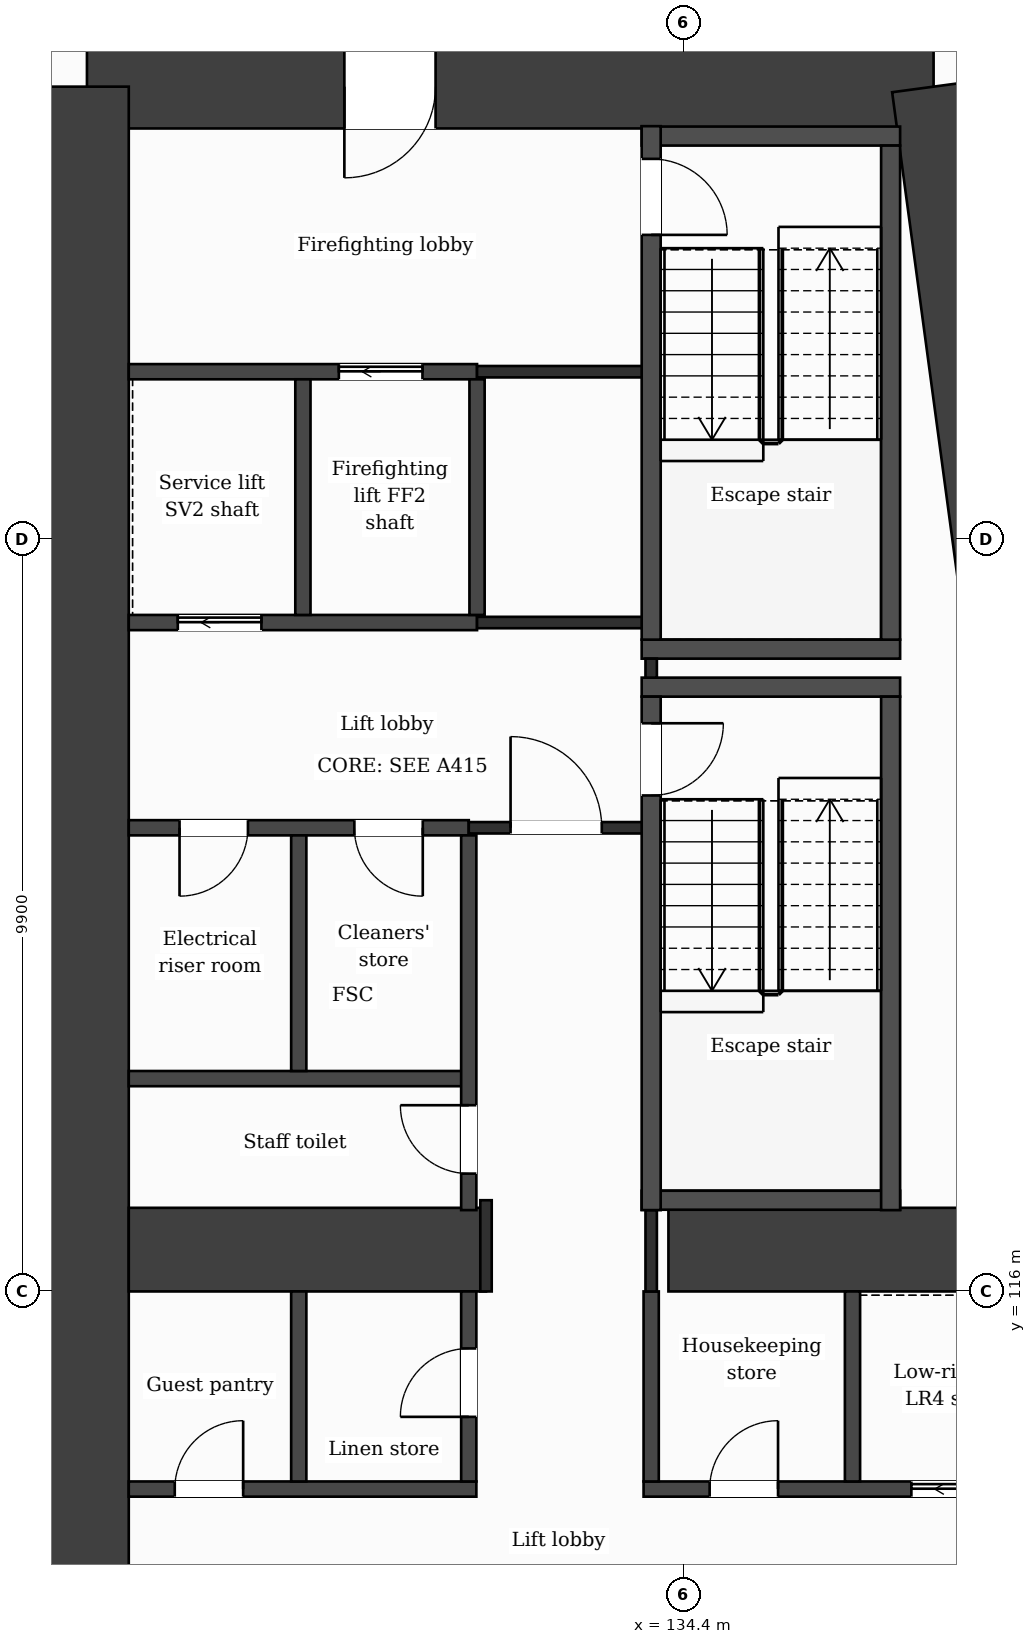
"""IFC4 building model, lengths in metres.
Left out: names, types, materials, properties, quantities, classifications, styles, units other than length and angle.
Written with IfcOpenShell. Run it as: python <this file> out.ifc"""

import sys

from ifc_helpers import new_model, si_unit, direction, frame, frame_2d, origin, place, context, subcontext, project, spatial, rectangle, extrude, element, fill, save


model = new_model("IFC4")
c1 = context("Model", 3, precision=1e-05, world=origin(), true_north=direction((0.0, 1.0)))
c2 = subcontext(c1, "Body", "Model", "MODEL_VIEW")
j1 = project(units=[si_unit("LENGTHUNIT", "METRE"), si_unit("PLANEANGLEUNIT", "RADIAN")], contexts=[c1])
p1 = place(None, origin())
s1 = spatial("IfcSite", under=j1, at=p1, CompositionType="ELEMENT")
p2 = place(p1, origin())
s2 = spatial("IfcBuilding", under=s1, at=p2, CompositionType="ELEMENT")
p3 = place(p2, frame((0.0, 0.0, 67.0)))
s3 = spatial("IfcBuildingStorey", under=s2, at=p3, CompositionType="ELEMENT", Elevation=67.0)
p4 = place(p3, frame((126.55, 131.85, 0.0), z_axis=(0.0, 0.0, 1.0), x_axis=(1.0, 0.0, 0.0)))
e1 = element("IfcWall", 1, at=p4, inside=s3, PredefinedType="SHEAR", context=c2, shape_type="SweptSolid", body=[
    extrude(rectangle(XDim=11.138, YDim=1.1, at=frame_2d((5.569, 0.0))), origin(), (0.0, 0.0, 1.0), 3.5),
])
p5 = place(p4, frame((3.386, 0.0, 0.0)))
e2 = element("IfcOpeningElement", 2, at=p5, cuts=e1, PredefinedType="OPENING", context=c2, shape_type="SweptSolid", body=[
    extrude(rectangle(XDim=1.2, YDim=2.1, at=frame_2d((0.6, 1.05))), frame((0.0, 0.56, 0.0), z_axis=(0.0, -1.0, 0.0), x_axis=(1.0, 0.0, 0.0)), (0.0, 0.0, 1.0), 1.12),
])
p6 = place(p3, frame((137.688, 131.85, 0.0), z_axis=(0.0, 0.0, 1.0), x_axis=(0.133411793472, -0.991060691059, 0.0)))
e3 = element("IfcWall", 3, at=p6, inside=s3, PredefinedType="SHEAR", context=c2, shape_type="SweptSolid", body=[
    extrude(rectangle(XDim=21.089, YDim=1.1, at=frame_2d((10.544, 0.0))), origin(), (0.0, 0.0, 1.0), 3.5),
])
p7 = place(p3, frame((126.55, 110.95, 0.0), z_axis=(0.0, 0.0, 1.0), x_axis=(0.0, 1.0, 0.0)))
e4 = element("IfcWall", 4, at=p7, inside=s3, PredefinedType="SHEAR", context=c2, shape_type="SweptSolid", body=[
    extrude(rectangle(XDim=20.9, YDim=1.1, at=frame_2d((10.45, 0.0))), origin(), (0.0, 0.0, 1.0), 3.5),
])
p8 = place(p3, frame((127.1, 116.55, 0.0), z_axis=(0.0, 0.0, 1.0), x_axis=(1.0, 0.0, 0.0)))
e5 = element("IfcWall", 5, at=p8, inside=s3, PredefinedType="SHEAR", context=c2, shape_type="SweptSolid", body=[
    extrude(rectangle(XDim=4.7, YDim=1.1, at=frame_2d((2.35, 0.0))), origin(), (0.0, 0.0, 1.0), 3.5),
])
p9 = place(p3, frame((134.2, 116.55, 0.0), z_axis=(0.0, 0.0, 1.0), x_axis=(1.0, 0.0, 0.0)))
e6 = element("IfcWall", 6, at=p9, inside=s3, PredefinedType="SHEAR", context=c2, shape_type="SweptSolid", body=[
    extrude(rectangle(XDim=5.077, YDim=1.1, at=frame_2d((2.539, 0.0))), origin(), (0.0, 0.0, 1.0), 3.5),
])
p10 = place(p3, frame((127.1, 113.4, 0.0), z_axis=(0.0, 0.0, 1.0), x_axis=(1.0, 0.0, 0.0)))
e7 = element("IfcWall", 7, at=p10, inside=s3, PredefinedType="PARTITIONING", context=c2, shape_type="SweptSolid", body=[
    extrude(rectangle(XDim=4.573, YDim=0.2, at=frame_2d((2.287, 0.0))), origin(), (0.0, 0.0, 1.0), 3.18),
])
p11 = place(p10, frame((0.605, 0.0, 0.0)))
e8 = element("IfcOpeningElement", 8, at=p11, cuts=e7, PredefinedType="OPENING", context=c2, shape_type="SweptSolid", body=[
    extrude(rectangle(XDim=0.9, YDim=2.1, at=frame_2d((0.45, 1.05))), frame((0.0, 0.11, 0.0), z_axis=(0.0, -1.0, 0.0), x_axis=(1.0, 0.0, 0.0)), (0.0, 0.0, 1.0), 0.22),
])
p12 = place(p3, frame((133.873, 113.4, 0.0), z_axis=(0.0, 0.0, 1.0), x_axis=(1.0, 0.0, 0.0)))
e9 = element("IfcWall", 9, at=p12, inside=s3, PredefinedType="PARTITIONING", context=c2, shape_type="SweptSolid", body=[
    extrude(rectangle(XDim=5.774, YDim=0.2, at=frame_2d((2.887, 0.0))), origin(), (0.0, 0.0, 1.0), 3.18),
])
p13 = place(p12, frame((3.523, 0.0, 0.0)))
e10 = element("IfcOpeningElement", 10, at=p13, cuts=e9, PredefinedType="OPENING", context=c2, shape_type="SweptSolid", body=[
    extrude(rectangle(XDim=1.1, YDim=2.1, at=frame_2d((0.55, 1.05))), frame((0.0, 0.11, 0.0), z_axis=(0.0, -1.0, 0.0), x_axis=(1.0, 0.0, 0.0)), (0.0, 0.0, 1.0), 0.22),
])
p14 = place(p12, frame((0.869, 0.0, 0.0)))
e11 = element("IfcOpeningElement", 11, at=p14, cuts=e9, PredefinedType="OPENING", context=c2, shape_type="SweptSolid", body=[
    extrude(rectangle(XDim=0.9, YDim=2.1, at=frame_2d((0.45, 1.05))), frame((0.0, 0.11, 0.0), z_axis=(0.0, -1.0, 0.0), x_axis=(1.0, 0.0, 0.0)), (0.0, 0.0, 1.0), 0.22),
])
p15 = place(p3, frame((133.848, 117.2, 0.0), z_axis=(0.0, 0.0, 1.0), x_axis=(1.0, 0.0, 0.0)))
e12 = element("IfcWall", 12, at=p15, inside=s3, PredefinedType="PARTITIONING", context=c2, shape_type="SweptSolid", body=[
    extrude(rectangle(XDim=3.4, YDim=0.25, at=frame_2d((1.7, 0.0))), origin(), (0.0, 0.0, 1.0), 3.18),
])
p16 = place(p3, frame((127.1, 118.8, 0.0), z_axis=(0.0, 0.0, 1.0), x_axis=(1.0, 0.0, 0.0)))
e13 = element("IfcWall", 13, at=p16, inside=s3, PredefinedType="PARTITIONING", context=c2, shape_type="SweptSolid", body=[
    extrude(rectangle(XDim=4.473, YDim=0.2, at=frame_2d((2.236, 0.0))), origin(), (0.0, 0.0, 1.0), 3.18),
])
p17 = place(p3, frame((127.1, 122.1, 0.0), z_axis=(0.0, 0.0, 1.0), x_axis=(1.0, 0.0, 0.0)))
e14 = element("IfcWall", 14, at=p17, inside=s3, PredefinedType="PARTITIONING", context=c2, shape_type="SweptSolid", body=[
    extrude(rectangle(XDim=4.473, YDim=0.2, at=frame_2d((2.236, 0.0))), origin(), (0.0, 0.0, 1.0), 3.18),
])
p18 = place(p17, frame((2.968, 0.0, 0.0)))
e15 = element("IfcOpeningElement", 15, at=p18, cuts=e14, PredefinedType="OPENING", context=c2, shape_type="SweptSolid", body=[
    extrude(rectangle(XDim=0.9, YDim=2.1, at=frame_2d((0.45, 1.05))), frame((0.0, 0.11, 0.0), z_axis=(0.0, -1.0, 0.0), x_axis=(1.0, 0.0, 0.0)), (0.0, 0.0, 1.0), 0.22),
])
p19 = place(p17, frame((0.668, 0.0, 0.0)))
e16 = element("IfcOpeningElement", 16, at=p19, cuts=e14, PredefinedType="OPENING", context=c2, shape_type="SweptSolid", body=[
    extrude(rectangle(XDim=0.9, YDim=2.1, at=frame_2d((0.45, 1.05))), frame((0.0, 0.11, 0.0), z_axis=(0.0, -1.0, 0.0), x_axis=(1.0, 0.0, 0.0)), (0.0, 0.0, 1.0), 0.22),
])
p20 = place(p3, frame((131.573, 122.1, 0.0), z_axis=(0.0, 0.0, 1.0), x_axis=(1.0, 0.0, 0.0)))
e17 = element("IfcWall", 17, at=p20, inside=s3, PredefinedType="PARTITIONING", context=c2, shape_type="SweptSolid", body=[
    extrude(rectangle(XDim=2.4, YDim=0.15, at=frame_2d((1.2, 0.0))), origin(), (0.0, 0.0, 1.0), 3.18),
])
p21 = place(p20, frame((0.55, 0.0, 0.0)))
e18 = element("IfcOpeningElement", 18, at=p21, cuts=e17, PredefinedType="OPENING", context=c2, shape_type="SweptSolid", body=[
    extrude(rectangle(XDim=1.2, YDim=2.1, at=frame_2d((0.6, 1.05))), frame((0.0, 0.085, 0.0), z_axis=(0.0, -1.0, 0.0), x_axis=(1.0, 0.0, 0.0)), (0.0, 0.0, 1.0), 0.17),
])
for number, where, z_axis, x_axis in (
    (19, (133.848, 123.95, 0.0), (0.0, 0.0, 1.0), (1.0, 0.0, 0.0)),
    (20, (133.848, 124.45, 0.0), (0.0, 0.0, 1.0), (1.0, 0.0, 0.0)),
):
    element("IfcWall", number, at=place(p3, frame(where, z_axis=z_axis, x_axis=x_axis)), inside=s3, PredefinedType="PARTITIONING", context=c2, shape_type="SweptSolid", body=[
        extrude(rectangle(XDim=3.4, YDim=0.25, at=frame_2d((1.7, 0.0))), origin(), (0.0, 0.0, 1.0), 3.18),
    ])
p22 = place(p3, frame((127.1, 124.8, 0.0), z_axis=(0.0, 0.0, 1.0), x_axis=(1.0, 0.0, 0.0)))
e21 = element("IfcWall", 21, at=p22, inside=s3, PredefinedType="PARTITIONING", context=c2, shape_type="SweptSolid", body=[
    extrude(rectangle(XDim=4.582, YDim=0.2, at=frame_2d((2.291, 0.0))), origin(), (0.0, 0.0, 1.0), 3.18),
])
p23 = place(p22, frame((0.645, 0.0, 0.0)))
e22 = element("IfcOpeningElement", 22, at=p23, cuts=e21, PredefinedType="OPENING", context=c2, shape_type="SweptSolid", body=[
    extrude(rectangle(XDim=1.1, YDim=2.1, at=frame_2d((0.55, 1.05))), frame((0.0, 0.11, 0.0), z_axis=(0.0, -1.0, 0.0), x_axis=(1.0, 0.0, 0.0)), (0.0, 0.0, 1.0), 0.22),
])
p24 = place(p3, frame((131.682, 124.8, 0.0), z_axis=(0.0, 0.0, 1.0), x_axis=(1.0, 0.0, 0.0)))
e23 = element("IfcWall", 23, at=p24, inside=s3, PredefinedType="PARTITIONING", context=c2, shape_type="SweptSolid", body=[
    extrude(rectangle(XDim=2.416, YDim=0.15, at=frame_2d((1.208, 0.0))), origin(), (0.0, 0.0, 1.0), 3.18),
])
p25 = place(p3, frame((127.1, 128.1, 0.0), z_axis=(0.0, 0.0, 1.0), x_axis=(1.0, 0.0, 0.0)))
e24 = element("IfcWall", 24, at=p25, inside=s3, PredefinedType="PARTITIONING", context=c2, shape_type="SweptSolid", body=[
    extrude(rectangle(XDim=4.582, YDim=0.2, at=frame_2d((2.291, 0.0))), origin(), (0.0, 0.0, 1.0), 3.18),
])
p26 = place(p25, frame((2.764, 0.0, 0.0)))
e25 = element("IfcOpeningElement", 25, at=p26, cuts=e24, PredefinedType="OPENING", context=c2, shape_type="SweptSolid", body=[
    extrude(rectangle(XDim=1.1, YDim=2.1, at=frame_2d((0.55, 1.05))), frame((0.0, 0.11, 0.0), z_axis=(0.0, -1.0, 0.0), x_axis=(1.0, 0.0, 0.0)), (0.0, 0.0, 1.0), 0.22),
])
p27 = place(p3, frame((131.682, 128.1, 0.0), z_axis=(0.0, 0.0, 1.0), x_axis=(1.0, 0.0, 0.0)))
e26 = element("IfcWall", 26, at=p27, inside=s3, PredefinedType="PARTITIONING", context=c2, shape_type="SweptSolid", body=[
    extrude(rectangle(XDim=2.291, YDim=0.15, at=frame_2d((1.146, 0.0))), origin(), (0.0, 0.0, 1.0), 3.18),
])
p28 = place(p3, frame((133.848, 131.2, 0.0), z_axis=(0.0, 0.0, 1.0), x_axis=(1.0, 0.0, 0.0)))
e27 = element("IfcWall", 27, at=p28, inside=s3, PredefinedType="PARTITIONING", context=c2, shape_type="SweptSolid", body=[
    extrude(rectangle(XDim=3.4, YDim=0.25, at=frame_2d((1.7, 0.0))), origin(), (0.0, 0.0, 1.0), 3.18),
])
p29 = place(p3, frame((129.336, 113.5, 0.0), z_axis=(0.0, 0.0, 1.0), x_axis=(0.0, 1.0, 0.0)))
e28 = element("IfcWall", 28, at=p29, inside=s3, PredefinedType="PARTITIONING", context=c2, shape_type="SweptSolid", body=[
    extrude(rectangle(XDim=2.5, YDim=0.2, at=frame_2d((1.25, 0.0))), origin(), (0.0, 0.0, 1.0), 3.18),
])
for number, where, z_axis, x_axis in (
    (29, (129.336, 118.9, 0.0), (0.0, 0.0, 1.0), (0.0, 1.0, 0.0)),
    (30, (129.391, 124.9, 0.0), (0.0, 0.0, 1.0), (0.0, 1.0, 0.0)),
):
    element("IfcWall", number, at=place(p3, frame(where, z_axis=z_axis, x_axis=x_axis)), inside=s3, PredefinedType="PARTITIONING", context=c2, shape_type="SweptSolid", body=[
        extrude(rectangle(XDim=3.1, YDim=0.2, at=frame_2d((1.55, 0.0))), origin(), (0.0, 0.0, 1.0), 3.18),
    ])
p30 = place(p3, frame((131.573, 113.5, 0.0), z_axis=(0.0, 0.0, 1.0), x_axis=(0.0, 1.0, 0.0)))
e31 = element("IfcWall", 31, at=p30, inside=s3, PredefinedType="PARTITIONING", context=c2, shape_type="SweptSolid", body=[
    extrude(rectangle(XDim=2.5, YDim=0.2, at=frame_2d((1.25, 0.0))), origin(), (0.0, 0.0, 1.0), 3.18),
])
p31 = place(p30, frame((0.85, 0.0, 0.0)))
e32 = element("IfcOpeningElement", 32, at=p31, cuts=e31, PredefinedType="OPENING", context=c2, shape_type="SweptSolid", body=[
    extrude(rectangle(XDim=0.9, YDim=2.1, at=frame_2d((0.45, 1.05))), frame((0.0, 0.11, 0.0), z_axis=(0.0, -1.0, 0.0), x_axis=(1.0, 0.0, 0.0)), (0.0, 0.0, 1.0), 0.22),
])
p32 = place(p3, frame((131.573, 117.07, 0.0), z_axis=(0.0, 0.0, 1.0), x_axis=(0.0, 1.0, 0.0)))
e33 = element("IfcWall", 33, at=p32, inside=s3, PredefinedType="PARTITIONING", context=c2, shape_type="SweptSolid", body=[
    extrude(rectangle(XDim=4.93, YDim=0.2, at=frame_2d((2.465, 0.0))), origin(), (0.0, 0.0, 1.0), 3.18),
])
p33 = place(p32, frame((0.48, 0.0, 0.0)))
e34 = element("IfcOpeningElement", 34, at=p33, cuts=e33, PredefinedType="OPENING", context=c2, shape_type="SweptSolid", body=[
    extrude(rectangle(XDim=0.9, YDim=2.1, at=frame_2d((0.45, 1.05))), frame((0.0, 0.11, 0.0), z_axis=(0.0, -1.0, 0.0), x_axis=(1.0, 0.0, 0.0)), (0.0, 0.0, 1.0), 0.22),
])
p34 = place(p3, frame((131.682, 124.9, 0.0), z_axis=(0.0, 0.0, 1.0), x_axis=(0.0, 1.0, 0.0)))
e35 = element("IfcWall", 35, at=p34, inside=s3, PredefinedType="PARTITIONING", context=c2, shape_type="SweptSolid", body=[
    extrude(rectangle(XDim=3.1, YDim=0.2, at=frame_2d((1.55, 0.0))), origin(), (0.0, 0.0, 1.0), 3.18),
])
p35 = place(p3, frame((131.8, 116.0, 0.0), z_axis=(0.0, 0.0, 1.0), x_axis=(0.0, 1.0, 0.0)))
e36 = element("IfcWall", 36, at=p35, inside=s3, PredefinedType="PARTITIONING", context=c2, shape_type="SweptSolid", body=[
    extrude(rectangle(XDim=1.2, YDim=0.15, at=frame_2d((0.6, 0.0))), origin(), (0.0, 0.0, 1.0), 3.18),
])
p36 = place(p3, frame((133.973, 113.5, 0.0), z_axis=(0.0, 0.0, 1.0), x_axis=(0.0, 1.0, 0.0)))
e37 = element("IfcWall", 37, at=p36, inside=s3, PredefinedType="PARTITIONING", context=c2, shape_type="SweptSolid", body=[
    extrude(rectangle(XDim=2.5, YDim=0.2, at=frame_2d((1.25, 0.0))), origin(), (0.0, 0.0, 1.0), 3.18),
])
p37 = place(p3, frame((133.973, 116.0, 0.0), z_axis=(0.0, 0.0, 1.0), x_axis=(0.0, 1.0, 0.0)))
e38 = element("IfcWall", 38, at=p37, inside=s3, PredefinedType="PARTITIONING", context=c2, shape_type="SweptSolid", body=[
    extrude(rectangle(XDim=1.07, YDim=0.15, at=frame_2d((0.535, 0.0))), origin(), (0.0, 0.0, 1.0), 3.18),
])
p38 = place(p3, frame((133.973, 124.075, 0.0), z_axis=(0.0, 0.0, 1.0), x_axis=(0.0, 1.0, 0.0)))
e39 = element("IfcWall", 39, at=p38, inside=s3, PredefinedType="PARTITIONING", context=c2, shape_type="SweptSolid", body=[
    extrude(rectangle(XDim=0.25, YDim=0.15, at=frame_2d((0.125, 0.0))), origin(), (0.0, 0.0, 1.0), 3.18),
])
p39 = place(p3, frame((133.973, 117.07, 0.0), z_axis=(0.0, 0.0, 1.0), x_axis=(0.0, 1.0, 0.0)))
e40 = element("IfcWall", 40, at=p39, inside=s3, PredefinedType="PARTITIONING", context=c2, shape_type="SweptSolid", body=[
    extrude(rectangle(XDim=6.755, YDim=0.25, at=frame_2d((3.377, 0.0))), origin(), (0.0, 0.0, 1.0), 3.18),
])
p40 = place(p39, frame((5.455, 0.0, 0.0)))
e41 = element("IfcOpeningElement", 41, at=p40, cuts=e40, PredefinedType="OPENING", context=c2, shape_type="SweptSolid", body=[
    extrude(rectangle(XDim=0.95, YDim=2.1, at=frame_2d((0.475, 1.05))), frame((0.0, 0.135, 0.0), z_axis=(0.0, -1.0, 0.0), x_axis=(1.0, 0.0, 0.0)), (0.0, 0.0, 1.0), 0.27),
])
p41 = place(p3, frame((133.973, 124.575, 0.0), z_axis=(0.0, 0.0, 1.0), x_axis=(0.0, 1.0, 0.0)))
e42 = element("IfcWall", 42, at=p41, inside=s3, PredefinedType="PARTITIONING", context=c2, shape_type="SweptSolid", body=[
    extrude(rectangle(XDim=6.755, YDim=0.25, at=frame_2d((3.377, 0.0))), origin(), (0.0, 0.0, 1.0), 3.18),
])
p42 = place(p41, frame((5.325, 0.0, 0.0)))
e43 = element("IfcOpeningElement", 43, at=p42, cuts=e42, PredefinedType="OPENING", context=c2, shape_type="SweptSolid", body=[
    extrude(rectangle(XDim=1.0, YDim=2.1, at=frame_2d((0.5, 1.05))), frame((0.0, 0.135, 0.0), z_axis=(0.0, -1.0, 0.0), x_axis=(1.0, 0.0, 0.0)), (0.0, 0.0, 1.0), 0.27),
])
p43 = place(p3, frame((136.622, 113.5, 0.0), z_axis=(0.0, 0.0, 1.0), x_axis=(0.0, 1.0, 0.0)))
e44 = element("IfcWall", 44, at=p43, inside=s3, PredefinedType="PARTITIONING", context=c2, shape_type="SweptSolid", body=[
    extrude(rectangle(XDim=2.5, YDim=0.2, at=frame_2d((1.25, 0.0))), origin(), (0.0, 0.0, 1.0), 3.18),
])
p44 = place(p3, frame((137.123, 117.07, 0.0), z_axis=(0.0, 0.0, 1.0), x_axis=(0.0, 1.0, 0.0)))
e45 = element("IfcWall", 45, at=p44, inside=s3, PredefinedType="PARTITIONING", context=c2, shape_type="SweptSolid", body=[
    extrude(rectangle(XDim=6.755, YDim=0.25, at=frame_2d((3.377, 0.0))), origin(), (0.0, 0.0, 1.0), 3.18),
])
p45 = place(p3, frame((137.123, 124.575, 0.0), z_axis=(0.0, 0.0, 1.0), x_axis=(0.0, 1.0, 0.0)))
e46 = element("IfcWall", 46, at=p45, inside=s3, PredefinedType="PARTITIONING", context=c2, shape_type="SweptSolid", body=[
    extrude(rectangle(XDim=6.5, YDim=0.25, at=frame_2d((3.25, 0.0))), origin(), (0.0, 0.0, 1.0), 3.18),
])
p46 = place(p21, origin())
e47 = element("IfcDoor", 47, at=p46, inside=s3, OperationType="SINGLE_SWING_LEFT", PredefinedType="DOOR", context=c2, shape_type="SweptSolid", body=[
    extrude(rectangle(XDim=1.2, YDim=2.1, at=frame_2d((0.6, 1.05))), frame((0.0, 0.025, 0.0), z_axis=(0.0, -1.0, 0.0), x_axis=(1.0, 0.0, 0.0)), (0.0, 0.0, 1.0), 0.05),
])
fill(e18, e47)
p47 = place(p26, origin())
e48 = element("IfcDoor", 48, at=p47, inside=s3, OperationType="SLIDING_TO_LEFT", PredefinedType="DOOR", context=c2, shape_type="SweptSolid", body=[
    extrude(rectangle(XDim=1.1, YDim=2.1, at=frame_2d((0.55, 1.05))), frame((0.0, 0.025, 0.0), z_axis=(0.0, -1.0, 0.0), x_axis=(1.0, 0.0, 0.0)), (0.0, 0.0, 1.0), 0.05),
])
fill(e25, e48)
p48 = place(p23, origin())
e49 = element("IfcDoor", 49, at=p48, inside=s3, OperationType="SLIDING_TO_LEFT", PredefinedType="DOOR", context=c2, shape_type="SweptSolid", body=[
    extrude(rectangle(XDim=1.1, YDim=2.1, at=frame_2d((0.55, 1.05))), frame((0.0, 0.025, 0.0), z_axis=(0.0, -1.0, 0.0), x_axis=(1.0, 0.0, 0.0)), (0.0, 0.0, 1.0), 0.05),
])
fill(e22, e49)
p49 = place(p18, origin())
e50 = element("IfcDoor", 50, at=p49, inside=s3, OperationType="SINGLE_SWING_RIGHT", PredefinedType="DOOR", context=c2, shape_type="SweptSolid", body=[
    extrude(rectangle(XDim=0.9, YDim=2.1, at=frame_2d((0.45, 1.05))), frame((0.0, 0.025, 0.0), z_axis=(0.0, -1.0, 0.0), x_axis=(1.0, 0.0, 0.0)), (0.0, 0.0, 1.0), 0.05),
])
fill(e15, e50)
p50 = place(p19, origin())
e51 = element("IfcDoor", 51, at=p50, inside=s3, OperationType="SINGLE_SWING_LEFT", PredefinedType="DOOR", context=c2, shape_type="SweptSolid", body=[
    extrude(rectangle(XDim=0.9, YDim=2.1, at=frame_2d((0.45, 1.05))), frame((0.0, 0.025, 0.0), z_axis=(0.0, -1.0, 0.0), x_axis=(1.0, 0.0, 0.0)), (0.0, 0.0, 1.0), 0.05),
])
fill(e16, e51)
p51 = place(p40, origin())
e52 = element("IfcDoor", 52, at=p51, inside=s3, OperationType="SINGLE_SWING_RIGHT", PredefinedType="DOOR", context=c2, shape_type="SweptSolid", body=[
    extrude(rectangle(XDim=0.95, YDim=2.1, at=frame_2d((0.475, 1.05))), frame((0.0, 0.025, 0.0), z_axis=(0.0, -1.0, 0.0), x_axis=(1.0, 0.0, 0.0)), (0.0, 0.0, 1.0), 0.05),
])
fill(e41, e52)
p52 = place(p42, origin())
e53 = element("IfcDoor", 53, at=p52, inside=s3, OperationType="SINGLE_SWING_LEFT", PredefinedType="DOOR", context=c2, shape_type="SweptSolid", body=[
    extrude(rectangle(XDim=1.0, YDim=2.1, at=frame_2d((0.5, 1.05))), frame((0.0, 0.025, 0.0), z_axis=(0.0, -1.0, 0.0), x_axis=(1.0, 0.0, 0.0)), (0.0, 0.0, 1.0), 0.05),
])
fill(e43, e53)
p53 = place(p33, origin())
e54 = element("IfcDoor", 54, at=p53, inside=s3, OperationType="SINGLE_SWING_RIGHT", PredefinedType="DOOR", context=c2, shape_type="SweptSolid", body=[
    extrude(rectangle(XDim=0.9, YDim=2.1, at=frame_2d((0.45, 1.05))), frame((0.0, 0.025, 0.0), z_axis=(0.0, -1.0, 0.0), x_axis=(1.0, 0.0, 0.0)), (0.0, 0.0, 1.0), 0.05),
])
fill(e34, e54)
p54 = place(p13, origin())
e55 = element("IfcDoor", 55, at=p54, inside=s3, OperationType="SLIDING_TO_LEFT", PredefinedType="DOOR", context=c2, shape_type="SweptSolid", body=[
    extrude(rectangle(XDim=1.1, YDim=2.1, at=frame_2d((0.55, 1.05))), frame((0.0, 0.025, 0.0), z_axis=(0.0, -1.0, 0.0), x_axis=(1.0, 0.0, 0.0)), (0.0, 0.0, 1.0), 0.05),
])
fill(e10, e55)
p55 = place(p14, origin())
e56 = element("IfcDoor", 56, at=p55, inside=s3, OperationType="SINGLE_SWING_RIGHT", PredefinedType="DOOR", context=c2, shape_type="SweptSolid", body=[
    extrude(rectangle(XDim=0.9, YDim=2.1, at=frame_2d((0.45, 1.05))), frame((0.0, 0.025, 0.0), z_axis=(0.0, -1.0, 0.0), x_axis=(1.0, 0.0, 0.0)), (0.0, 0.0, 1.0), 0.05),
])
fill(e11, e56)
p56 = place(p31, origin())
e57 = element("IfcDoor", 57, at=p56, inside=s3, OperationType="SINGLE_SWING_LEFT", PredefinedType="DOOR", context=c2, shape_type="SweptSolid", body=[
    extrude(rectangle(XDim=0.9, YDim=2.1, at=frame_2d((0.45, 1.05))), frame((0.0, 0.025, 0.0), z_axis=(0.0, -1.0, 0.0), x_axis=(1.0, 0.0, 0.0)), (0.0, 0.0, 1.0), 0.05),
])
fill(e32, e57)
p57 = place(p11, origin())
e58 = element("IfcDoor", 58, at=p57, inside=s3, OperationType="SINGLE_SWING_RIGHT", PredefinedType="DOOR", context=c2, shape_type="SweptSolid", body=[
    extrude(rectangle(XDim=0.9, YDim=2.1, at=frame_2d((0.45, 1.05))), frame((0.0, 0.025, 0.0), z_axis=(0.0, -1.0, 0.0), x_axis=(1.0, 0.0, 0.0)), (0.0, 0.0, 1.0), 0.05),
])
fill(e8, e58)
p58 = place(p5, origin())
e59 = element("IfcDoor", 59, at=p58, inside=s3, OperationType="SINGLE_SWING_LEFT", PredefinedType="DOOR", context=c2, shape_type="SweptSolid", body=[
    extrude(rectangle(XDim=1.2, YDim=2.1, at=frame_2d((0.6, 1.05))), frame((0.0, 0.025, 0.0), z_axis=(0.0, -1.0, 0.0), x_axis=(1.0, 0.0, 0.0)), (0.0, 0.0, 1.0), 0.05),
])
fill(e2, e59)
save(model, sys.argv[1])
